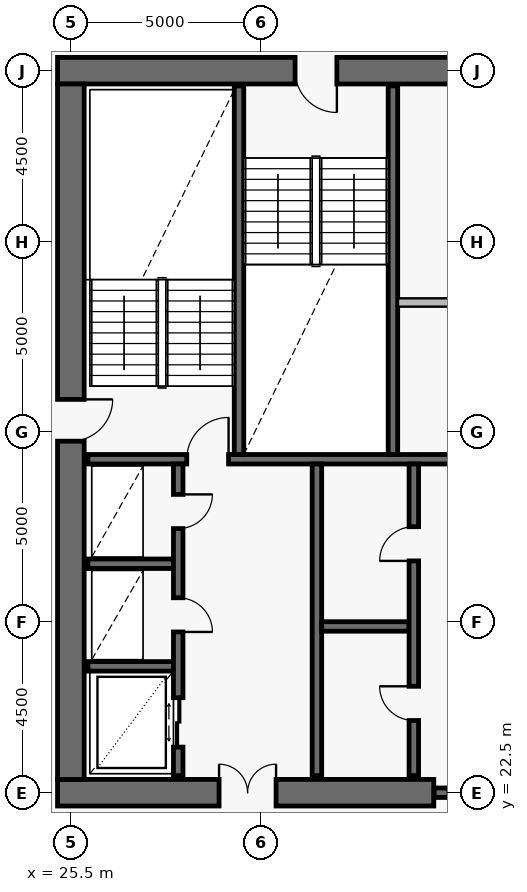
"""IFC4 building model, lengths in metres.
Left out: names, types, materials, properties, quantities, classifications, styles, units other than length and angle.
Written with IfcOpenShell. Run it as: python <this file> out.ifc"""

import sys

from ifc_helpers import new_model, si_unit, direction, frame, frame_2d, origin, place, context, subcontext, project, spatial, rectangle, extrude, element, fill, save


model = new_model("IFC4")
c1 = context("Model", 3, precision=1e-05, world=origin(), true_north=direction((0.0, 1.0)))
c2 = subcontext(c1, "Body", "Model", "MODEL_VIEW")
j1 = project(units=[si_unit("LENGTHUNIT", "METRE"), si_unit("PLANEANGLEUNIT", "RADIAN")], contexts=[c1])
p1 = place(None, origin())
s1 = spatial("IfcSite", under=j1, at=p1, CompositionType="ELEMENT")
p2 = place(p1, origin())
s2 = spatial("IfcBuilding", under=s1, at=p2, CompositionType="ELEMENT")
p3 = place(p2, frame((0.0, 0.0, 184.6)))
s3 = spatial("IfcBuildingStorey", under=s2, at=p3, CompositionType="ELEMENT", Elevation=184.6)
p4 = place(p3, frame((25.15, 22.5, 0.0), z_axis=(0.0, 0.0, 1.0), x_axis=(1.0, 0.0, 0.0)))
e1 = element("IfcWall", 1, at=p4, inside=s3, PredefinedType="SHEAR", context=c2, shape_type="SweptSolid", body=[
    extrude(rectangle(XDim=9.9, YDim=0.7, at=frame_2d((4.95, 0.0))), origin(), (0.0, 0.0, 1.0), 3.8),
])
p5 = place(p4, frame((4.25, 0.0, 0.0)))
e2 = element("IfcOpeningElement", 2, at=p5, cuts=e1, PredefinedType="OPENING", context=c2, shape_type="SweptSolid", body=[
    extrude(rectangle(XDim=1.5, YDim=2.15, at=frame_2d((0.75, 1.075))), frame((0.0, 0.362, 0.0), z_axis=(0.0, -1.0, 0.0), x_axis=(1.0, 0.0, 0.0)), (0.0, 0.0, 1.0), 0.724),
])
p6 = place(p3, frame((36.75, 41.5, 0.0), z_axis=(0.0, 0.0, 1.0), x_axis=(-1.0, 0.0, 0.0)))
e3 = element("IfcWall", 3, at=p6, inside=s3, PredefinedType="SHEAR", context=c2, shape_type="SweptSolid", body=[
    extrude(rectangle(XDim=11.6, YDim=0.7, at=frame_2d((5.8, 0.0))), origin(), (0.0, 0.0, 1.0), 3.8),
])
p7 = place(p6, frame((4.25, 0.0, 0.0)))
e4 = element("IfcOpeningElement", 4, at=p7, cuts=e3, PredefinedType="OPENING", context=c2, shape_type="SweptSolid", body=[
    extrude(rectangle(XDim=1.1, YDim=2.15, at=frame_2d((0.55, 1.075))), frame((0.0, 0.362, 0.0), z_axis=(0.0, -1.0, 0.0), x_axis=(1.0, 0.0, 0.0)), (0.0, 0.0, 1.0), 0.724),
])
p8 = place(p3, frame((25.5, 22.85, 0.0), z_axis=(0.0, 0.0, 1.0), x_axis=(0.0, 1.0, 0.0)))
e5 = element("IfcWall", 5, at=p8, inside=s3, PredefinedType="SHEAR", context=c2, shape_type="SweptSolid", body=[
    extrude(rectangle(XDim=18.3, YDim=0.7, at=frame_2d((9.15, 0.0))), origin(), (0.0, 0.0, 1.0), 3.8),
])
p9 = place(p8, frame((8.9, 0.0, 0.0)))
e6 = element("IfcOpeningElement", 6, at=p9, cuts=e5, PredefinedType="OPENING", context=c2, shape_type="SweptSolid", body=[
    extrude(rectangle(XDim=1.1, YDim=2.15, at=frame_2d((0.55, 1.075))), frame((0.0, 0.362, 0.0), z_axis=(0.0, -1.0, 0.0), x_axis=(1.0, 0.0, 0.0)), (0.0, 0.0, 1.0), 0.724),
])
p10 = place(p3, frame((35.06, 22.5, 0.0), z_axis=(0.0, 0.0, 1.0), x_axis=(1.0, 0.0, 0.0)))
e7 = element("IfcWall", 7, at=p10, inside=s3, PredefinedType="SOLIDWALL", context=c2, shape_type="SweptSolid", body=[
    extrude(rectangle(XDim=2.28, YDim=0.25, at=frame_2d((1.14, 0.0))), origin(), (0.0, 0.0, 1.0), 3.8),
])
p11 = place(p10, frame((0.39, 0.0, 0.0)))
e8 = element("IfcOpeningElement", 8, at=p11, cuts=e7, PredefinedType="OPENING", context=c2, shape_type="SweptSolid", body=[
    extrude(rectangle(XDim=1.5, YDim=2.15, at=frame_2d((0.75, 1.075))), frame((0.0, 0.137, 0.0), z_axis=(0.0, -1.0, 0.0), x_axis=(1.0, 0.0, 0.0)), (0.0, 0.0, 1.0), 0.274),
])
p12 = place(p3, frame((25.95, 31.275, 0.0), z_axis=(0.0, 0.0, 1.0), x_axis=(1.0, 0.0, 0.0)))
e9 = element("IfcWall", 9, at=p12, inside=s3, PredefinedType="SOLIDWALL", context=c2, shape_type="SweptSolid", body=[
    extrude(rectangle(XDim=20.1, YDim=0.25, at=frame_2d((10.05, 0.0))), origin(), (0.0, 0.0, 1.0), 3.8),
])
p13 = place(p12, frame((2.6, 0.0, 0.0)))
e10 = element("IfcOpeningElement", 10, at=p13, cuts=e9, PredefinedType="OPENING", context=c2, shape_type="SweptSolid", body=[
    extrude(rectangle(XDim=1.1, YDim=2.15, at=frame_2d((0.55, 1.075))), frame((0.0, 0.137, 0.0), z_axis=(0.0, -1.0, 0.0), x_axis=(1.0, 0.0, 0.0)), (0.0, 0.0, 1.0), 0.274),
])
p14 = place(p12, frame((10.6, 0.0, 0.0)))
e11 = element("IfcOpeningElement", 11, at=p14, cuts=e9, PredefinedType="OPENING", context=c2, shape_type="SweptSolid", body=[
    extrude(rectangle(XDim=1.1, YDim=2.15, at=frame_2d((0.55, 1.075))), frame((0.0, 0.137, 0.0), z_axis=(0.0, -1.0, 0.0), x_axis=(1.0, 0.0, 0.0)), (0.0, 0.0, 1.0), 0.274),
])
p15 = place(p12, frame((16.35, 0.0, 0.0)))
e12 = element("IfcOpeningElement", 12, at=p15, cuts=e9, PredefinedType="OPENING", context=c2, shape_type="SweptSolid", body=[
    extrude(rectangle(XDim=1.1, YDim=2.15, at=frame_2d((0.55, 1.075))), frame((0.0, 0.137, 0.0), z_axis=(0.0, -1.0, 0.0), x_axis=(1.0, 0.0, 0.0)), (0.0, 0.0, 1.0), 0.274),
])
for number, where, z_axis, x_axis in (
    (13, (29.925, 31.4, 0.0), (0.0, 0.0, 1.0), (0.0, 1.0, 0.0)),
    (14, (33.975, 31.4, 0.0), (0.0, 0.0, 1.0), (0.0, 1.0, 0.0)),
):
    element("IfcWall", number, at=place(p3, frame(where, z_axis=z_axis, x_axis=x_axis)), inside=s3, PredefinedType="SOLIDWALL", context=c2, shape_type="SweptSolid", body=[
        extrude(rectangle(XDim=9.7, YDim=0.25, at=frame_2d((4.85, 0.0))), origin(), (0.0, 0.0, 1.0), 3.8),
    ])
for number, where, z_axis, x_axis in (
    (15, (25.95, 25.825, 0.0), (0.0, 0.0, 1.0), (1.0, 0.0, 0.0)),
    (16, (25.95, 28.525, 0.0), (0.0, 0.0, 1.0), (1.0, 0.0, 0.0)),
):
    element("IfcWall", number, at=place(p3, frame(where, z_axis=z_axis, x_axis=x_axis)), inside=s3, PredefinedType="SOLIDWALL", context=c2, shape_type="SweptSolid", body=[
        extrude(rectangle(XDim=2.25, YDim=0.25, at=frame_2d((1.125, 0.0))), origin(), (0.0, 0.0, 1.0), 3.8),
    ])
p16 = place(p3, frame((28.325, 22.95, 0.0), z_axis=(0.0, 0.0, 1.0), x_axis=(0.0, 1.0, 0.0)))
e17 = element("IfcWall", 17, at=p16, inside=s3, PredefinedType="SOLIDWALL", context=c2, shape_type="SweptSolid", body=[
    extrude(rectangle(XDim=8.2, YDim=0.25, at=frame_2d((4.1, 0.0))), origin(), (0.0, 0.0, 1.0), 3.8),
])
p17 = place(p16, frame((0.75, 0.0, 0.0)))
e18 = element("IfcOpeningElement", 18, at=p17, cuts=e17, PredefinedType="OPENING", context=c2, shape_type="SweptSolid", body=[
    extrude(rectangle(XDim=1.3, YDim=2.3, at=frame_2d((0.65, 1.15))), frame((0.0, 0.137, 0.0), z_axis=(0.0, -1.0, 0.0), x_axis=(1.0, 0.0, 0.0)), (0.0, 0.0, 1.0), 0.274),
])
p18 = place(p16, frame((3.78, 0.0, 0.0)))
e19 = element("IfcOpeningElement", 19, at=p18, cuts=e17, PredefinedType="OPENING", context=c2, shape_type="SweptSolid", body=[
    extrude(rectangle(XDim=0.9, YDim=2.1, at=frame_2d((0.45, 1.05))), frame((0.0, 0.137, 0.0), z_axis=(0.0, -1.0, 0.0), x_axis=(1.0, 0.0, 0.0)), (0.0, 0.0, 1.0), 0.274),
])
p19 = place(p16, frame((6.5, 0.0, 0.0)))
e20 = element("IfcOpeningElement", 20, at=p19, cuts=e17, PredefinedType="OPENING", context=c2, shape_type="SweptSolid", body=[
    extrude(rectangle(XDim=0.9, YDim=2.1, at=frame_2d((0.45, 1.05))), frame((0.0, 0.137, 0.0), z_axis=(0.0, -1.0, 0.0), x_axis=(1.0, 0.0, 0.0)), (0.0, 0.0, 1.0), 0.274),
])
p20 = place(p3, frame((31.975, 22.95, 0.0), z_axis=(0.0, 0.0, 1.0), x_axis=(0.0, 1.0, 0.0)))
e21 = element("IfcWall", 21, at=p20, inside=s3, PredefinedType="SOLIDWALL", context=c2, shape_type="SweptSolid", body=[
    extrude(rectangle(XDim=8.2, YDim=0.25, at=frame_2d((4.1, 0.0))), origin(), (0.0, 0.0, 1.0), 3.8),
])
p21 = place(p3, frame((32.1, 26.875, 0.0), z_axis=(0.0, 0.0, 1.0), x_axis=(1.0, 0.0, 0.0)))
e22 = element("IfcWall", 22, at=p21, inside=s3, PredefinedType="SOLIDWALL", context=c2, shape_type="SweptSolid", body=[
    extrude(rectangle(XDim=2.3, YDim=0.25, at=frame_2d((1.15, 0.0))), origin(), (0.0, 0.0, 1.0), 3.8),
])
p22 = place(p3, frame((34.525, 22.95, 0.0), z_axis=(0.0, 0.0, 1.0), x_axis=(0.0, 1.0, 0.0)))
e23 = element("IfcWall", 23, at=p22, inside=s3, PredefinedType="SOLIDWALL", context=c2, shape_type="SweptSolid", body=[
    extrude(rectangle(XDim=8.2, YDim=0.25, at=frame_2d((4.1, 0.0))), origin(), (0.0, 0.0, 1.0), 3.8),
])
p23 = place(p22, frame((1.45, 0.0, 0.0)))
e24 = element("IfcOpeningElement", 24, at=p23, cuts=e23, PredefinedType="OPENING", context=c2, shape_type="SweptSolid", body=[
    extrude(rectangle(XDim=0.9, YDim=2.1, at=frame_2d((0.45, 1.05))), frame((0.0, 0.137, 0.0), z_axis=(0.0, -1.0, 0.0), x_axis=(1.0, 0.0, 0.0)), (0.0, 0.0, 1.0), 0.274),
])
p24 = place(p22, frame((5.65, 0.0, 0.0)))
e25 = element("IfcOpeningElement", 25, at=p24, cuts=e23, PredefinedType="OPENING", context=c2, shape_type="SweptSolid", body=[
    extrude(rectangle(XDim=0.9, YDim=2.1, at=frame_2d((0.45, 1.05))), frame((0.0, 0.137, 0.0), z_axis=(0.0, -1.0, 0.0), x_axis=(1.0, 0.0, 0.0)), (0.0, 0.0, 1.0), 0.274),
])
p25 = place(p3, frame((34.108, 35.4, 0.0), z_axis=(0.0, 0.0, 1.0), x_axis=(1.0, 0.0, 0.0)))
e26 = element("IfcWall", 26, at=p25, inside=s3, PredefinedType="PARTITIONING", context=c2, shape_type="SweptSolid", body=[
    extrude(rectangle(XDim=2.084, YDim=0.22, at=frame_2d((1.042, 0.0))), origin(), (0.0, 0.0, 1.0), 3.55),
])
p26 = place(p9, frame((1.1, 0.0, 0.0), z_axis=(0.0, 0.0, 1.0), x_axis=(-1.0, 0.0, 0.0)))
e27 = element("IfcDoor", 27, at=p26, inside=s3, OperationType="SINGLE_SWING_LEFT", PredefinedType="USERDEFINED", context=c2, shape_type="SweptSolid", body=[
    extrude(rectangle(XDim=1.1, YDim=2.15, at=frame_2d((0.55, 1.075))), frame((0.0, 0.025, 0.0), z_axis=(0.0, -1.0, 0.0), x_axis=(1.0, 0.0, 0.0)), (0.0, 0.0, 1.0), 0.05),
])
fill(e6, e27)
p27 = place(p7, origin())
e28 = element("IfcDoor", 28, at=p27, inside=s3, OperationType="SINGLE_SWING_LEFT", PredefinedType="USERDEFINED", context=c2, shape_type="SweptSolid", body=[
    extrude(rectangle(XDim=1.1, YDim=2.15, at=frame_2d((0.55, 1.075))), frame((0.0, 0.025, 0.0), z_axis=(0.0, -1.0, 0.0), x_axis=(1.0, 0.0, 0.0)), (0.0, 0.0, 1.0), 0.05),
])
fill(e4, e28)
p28 = place(p5, origin())
e29 = element("IfcDoor", 29, at=p28, inside=s3, OperationType="DOUBLE_DOOR_SINGLE_SWING", PredefinedType="DOOR", context=c2, shape_type="SweptSolid", body=[
    extrude(rectangle(XDim=1.5, YDim=2.15, at=frame_2d((0.75, 1.075))), frame((0.0, 0.025, 0.0), z_axis=(0.0, -1.0, 0.0), x_axis=(1.0, 0.0, 0.0)), (0.0, 0.0, 1.0), 0.05),
])
fill(e2, e29)
p29 = place(p13, origin())
e30 = element("IfcDoor", 30, at=p29, inside=s3, OperationType="SINGLE_SWING_RIGHT", PredefinedType="USERDEFINED", context=c2, shape_type="SweptSolid", body=[
    extrude(rectangle(XDim=1.1, YDim=2.15, at=frame_2d((0.55, 1.075))), frame((0.0, 0.025, 0.0), z_axis=(0.0, -1.0, 0.0), x_axis=(1.0, 0.0, 0.0)), (0.0, 0.0, 1.0), 0.05),
])
fill(e10, e30)
p30 = place(p17, frame((1.3, 0.0, 0.0), z_axis=(0.0, 0.0, 1.0), x_axis=(-1.0, 0.0, 0.0)))
e31 = element("IfcDoor", 31, at=p30, inside=s3, OperationType="DOUBLE_DOOR_SLIDING", PredefinedType="DOOR", context=c2, shape_type="SweptSolid", body=[
    extrude(rectangle(XDim=1.3, YDim=2.3, at=frame_2d((0.65, 1.15))), frame((0.0, 0.025, 0.0), z_axis=(0.0, -1.0, 0.0), x_axis=(1.0, 0.0, 0.0)), (0.0, 0.0, 1.0), 0.05),
])
fill(e18, e31)
p31 = place(p18, frame((0.9, 0.0, 0.0), z_axis=(0.0, 0.0, 1.0), x_axis=(-1.0, 0.0, 0.0)))
e32 = element("IfcDoor", 32, at=p31, inside=s3, OperationType="SINGLE_SWING_RIGHT", PredefinedType="DOOR", context=c2, shape_type="SweptSolid", body=[
    extrude(rectangle(XDim=0.9, YDim=2.1, at=frame_2d((0.45, 1.05))), frame((0.0, 0.025, 0.0), z_axis=(0.0, -1.0, 0.0), x_axis=(1.0, 0.0, 0.0)), (0.0, 0.0, 1.0), 0.05),
])
fill(e19, e32)
p32 = place(p19, frame((0.9, 0.0, 0.0), z_axis=(0.0, 0.0, 1.0), x_axis=(-1.0, 0.0, 0.0)))
e33 = element("IfcDoor", 33, at=p32, inside=s3, OperationType="SINGLE_SWING_LEFT", PredefinedType="DOOR", context=c2, shape_type="SweptSolid", body=[
    extrude(rectangle(XDim=0.9, YDim=2.1, at=frame_2d((0.45, 1.05))), frame((0.0, 0.025, 0.0), z_axis=(0.0, -1.0, 0.0), x_axis=(1.0, 0.0, 0.0)), (0.0, 0.0, 1.0), 0.05),
])
fill(e20, e33)
p33 = place(p23, origin())
e34 = element("IfcDoor", 34, at=p33, inside=s3, OperationType="SINGLE_SWING_RIGHT", PredefinedType="DOOR", context=c2, shape_type="SweptSolid", body=[
    extrude(rectangle(XDim=0.9, YDim=2.1, at=frame_2d((0.45, 1.05))), frame((0.0, 0.025, 0.0), z_axis=(0.0, -1.0, 0.0), x_axis=(1.0, 0.0, 0.0)), (0.0, 0.0, 1.0), 0.05),
])
fill(e24, e34)
p34 = place(p24, origin())
e35 = element("IfcDoor", 35, at=p34, inside=s3, OperationType="SINGLE_SWING_LEFT", PredefinedType="DOOR", context=c2, shape_type="SweptSolid", body=[
    extrude(rectangle(XDim=0.9, YDim=2.1, at=frame_2d((0.45, 1.05))), frame((0.0, 0.025, 0.0), z_axis=(0.0, -1.0, 0.0), x_axis=(1.0, 0.0, 0.0)), (0.0, 0.0, 1.0), 0.05),
])
fill(e25, e35)
save(model, sys.argv[1])
